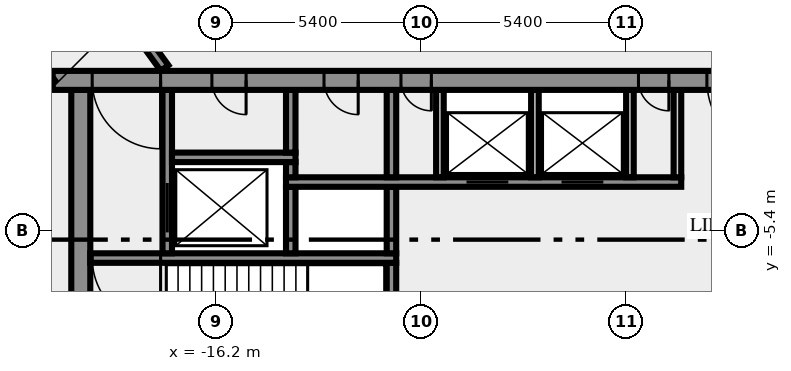
"""IFC4 building model, lengths in metres.
Left out: names, types, materials, properties, quantities, classifications, styles, units other than length and angle.
Written with IfcOpenShell. Run it as: python <this file> out.ifc"""

import sys

from ifc_helpers import new_model, si_unit, direction, frame, frame_2d, origin, place, context, subcontext, project, spatial, rectangle, extrude, element, fill, save


model = new_model("IFC4")
c1 = context("Model", 3, precision=1e-05, world=origin(), true_north=direction((0.0, 1.0)))
c2 = subcontext(c1, "Body", "Model", "MODEL_VIEW")
j1 = project(units=[si_unit("LENGTHUNIT", "METRE"), si_unit("PLANEANGLEUNIT", "RADIAN")], contexts=[c1])
p1 = place(None, origin())
s1 = spatial("IfcSite", under=j1, at=p1, CompositionType="ELEMENT")
p2 = place(p1, origin())
s2 = spatial("IfcBuilding", under=s1, at=p2, CompositionType="ELEMENT")
p3 = place(p2, frame((0.0, 0.0, 319.0)))
s3 = spatial("IfcBuildingStorey", under=s2, at=p3, CompositionType="ELEMENT", Elevation=319.0)
p4 = place(p3, frame((-19.75, -10.5, 0.0), z_axis=(0.0, 0.0, 1.0), x_axis=(0.0, 1.0, 0.0)))
e1 = element("IfcWall", 1, at=p4, inside=s3, PredefinedType="SHEAR", context=c2, shape_type="SweptSolid", body=[
    extrude(rectangle(XDim=8.8, YDim=0.5, at=frame_2d((4.4, 0.0))), origin(), (0.0, 0.0, 1.0), 3.65),
])
p5 = place(p3, frame((-11.575, -7.25, 0.0), z_axis=(0.0, 0.0, 1.0), x_axis=(0.0, 1.0, 0.0)))
e2 = element("IfcWall", 2, at=p5, inside=s3, PredefinedType="SHEAR", context=c2, shape_type="SweptSolid", body=[
    extrude(rectangle(XDim=1.0, YDim=0.25, at=frame_2d((0.5, 0.0))), origin(), (0.0, 0.0, 1.0), 3.65),
])
p6 = place(p3, frame((-11.45, -6.125, 0.0), z_axis=(0.0, 0.0, 1.0), x_axis=(-1.0, 0.0, 0.0)))
e3 = element("IfcWall", 3, at=p6, inside=s3, PredefinedType="SHEAR", context=c2, shape_type="SweptSolid", body=[
    extrude(rectangle(XDim=8.05, YDim=0.25, at=frame_2d((4.025, 0.0))), origin(), (0.0, 0.0, 1.0), 3.65),
])
p7 = place(p6, frame((6.2, 0.0, 0.0)))
e4 = element("IfcOpeningElement", 4, at=p7, cuts=e3, PredefinedType="OPENING", context=c2, shape_type="SweptSolid", body=[
    extrude(rectangle(XDim=1.8, YDim=2.1, at=frame_2d((0.9, 1.05))), frame((0.0, 0.135, 0.0), z_axis=(0.0, -1.0, 0.0), x_axis=(1.0, 0.0, 0.0)), (0.0, 0.0, 1.0), 0.27),
])
p8 = place(p3, frame((-17.475, -6.0, 0.0), z_axis=(0.0, 0.0, 1.0), x_axis=(0.0, 1.0, 0.0)))
e5 = element("IfcWall", 5, at=p8, inside=s3, PredefinedType="SHEAR", context=c2, shape_type="SweptSolid", body=[
    extrude(rectangle(XDim=4.3, YDim=0.25, at=frame_2d((2.15, 0.0))), origin(), (0.0, 0.0, 1.0), 3.65),
])
p9 = place(p8, frame((0.55, 0.0, 0.0)))
e6 = element("IfcOpeningElement", 6, at=p9, cuts=e5, PredefinedType="OPENING", context=c2, shape_type="SweptSolid", body=[
    extrude(rectangle(XDim=1.3, YDim=2.1, at=frame_2d((0.65, 1.05))), frame((0.0, 0.135, 0.0), z_axis=(0.0, -1.0, 0.0), x_axis=(1.0, 0.0, 0.0)), (0.0, 0.0, 1.0), 0.27),
])
for number, where, z_axis, x_axis in (
    (7, (-14.225, -6.0, 0.0), (0.0, 0.0, 1.0), (0.0, 1.0, 0.0)),
    (8, (-11.575, -6.0, 0.0), (0.0, 0.0, 1.0), (0.0, 1.0, 0.0)),
):
    element("IfcWall", number, at=place(p3, frame(where, z_axis=z_axis, x_axis=x_axis)), inside=s3, PredefinedType="SHEAR", context=c2, shape_type="SweptSolid", body=[
        extrude(rectangle(XDim=1.75, YDim=0.25, at=frame_2d((0.875, 0.0))), origin(), (0.0, 0.0, 1.0), 3.65),
    ])
p10 = place(p3, frame((-14.35, -4.125, 0.0), z_axis=(0.0, 0.0, 1.0), x_axis=(1.0, 0.0, 0.0)))
e9 = element("IfcWall", 9, at=p10, inside=s3, PredefinedType="SHEAR", context=c2, shape_type="SweptSolid", body=[
    extrude(rectangle(XDim=10.4, YDim=0.25, at=frame_2d((5.2, 0.0))), origin(), (0.0, 0.0, 1.0), 3.65),
])
p11 = place(p10, frame((4.75, 0.0, 0.0)))
e10 = element("IfcOpeningElement", 10, at=p11, cuts=e9, PredefinedType="OPENING", context=c2, shape_type="SweptSolid", body=[
    extrude(rectangle(XDim=1.1, YDim=2.1, at=frame_2d((0.55, 1.05))), frame((0.0, 0.135, 0.0), z_axis=(0.0, -1.0, 0.0), x_axis=(1.0, 0.0, 0.0)), (0.0, 0.0, 1.0), 0.27),
])
p12 = place(p10, frame((7.25, 0.0, 0.0)))
e11 = element("IfcOpeningElement", 11, at=p12, cuts=e9, PredefinedType="OPENING", context=c2, shape_type="SweptSolid", body=[
    extrude(rectangle(XDim=1.1, YDim=2.1, at=frame_2d((0.55, 1.05))), frame((0.0, 0.135, 0.0), z_axis=(0.0, -1.0, 0.0), x_axis=(1.0, 0.0, 0.0)), (0.0, 0.0, 1.0), 0.27),
])
p13 = place(p3, frame((-14.225, -4.0, 0.0), z_axis=(0.0, 0.0, 1.0), x_axis=(0.0, 1.0, 0.0)))
e12 = element("IfcWall", 12, at=p13, inside=s3, PredefinedType="SHEAR", context=c2, shape_type="SweptSolid", body=[
    extrude(rectangle(XDim=0.4, YDim=0.25, at=frame_2d((0.2, 0.0))), origin(), (0.0, 0.0, 1.0), 3.65),
])
p14 = place(p3, frame((-11.575, -4.0, 0.0), z_axis=(0.0, 0.0, 1.0), x_axis=(0.0, 1.0, 0.0)))
e13 = element("IfcWall", 13, at=p14, inside=s3, PredefinedType="SHEAR", context=c2, shape_type="SweptSolid", body=[
    extrude(rectangle(XDim=2.3, YDim=0.25, at=frame_2d((1.15, 0.0))), origin(), (0.0, 0.0, 1.0), 3.65),
])
for number, where, z_axis, x_axis in (
    (14, (-10.3, -4.0, 0.0), (0.0, 0.0, 1.0), (0.0, 1.0, 0.0)),
    (15, (-7.8, -4.0, 0.0), (0.0, 0.0, 1.0), (0.0, 1.0, 0.0)),
    (16, (-5.3, -4.0, 0.0), (0.0, 0.0, 1.0), (0.0, 1.0, 0.0)),
    (17, (-4.05, -4.0, 0.0), (0.0, 0.0, 1.0), (0.0, 1.0, 0.0)),
):
    element("IfcWall", number, at=place(p3, frame(where, z_axis=z_axis, x_axis=x_axis)), inside=s3, PredefinedType="SOLIDWALL", context=c2, shape_type="SweptSolid", body=[
        extrude(rectangle(XDim=2.3, YDim=0.2, at=frame_2d((1.15, 0.0))), origin(), (0.0, 0.0, 1.0), 3.65),
    ])
p15 = place(p3, frame((-17.35, -3.475, 0.0), z_axis=(0.0, 0.0, 1.0), x_axis=(1.0, 0.0, 0.0)))
e18 = element("IfcWall", 18, at=p15, inside=s3, PredefinedType="SHEAR", context=c2, shape_type="SweptSolid", body=[
    extrude(rectangle(XDim=3.25, YDim=0.25, at=frame_2d((1.625, 0.0))), origin(), (0.0, 0.0, 1.0), 3.65),
])
p16 = place(p3, frame((-14.225, -3.35, 0.0), z_axis=(0.0, 0.0, 1.0), x_axis=(0.0, 1.0, 0.0)))
e19 = element("IfcWall", 19, at=p16, inside=s3, PredefinedType="SHEAR", context=c2, shape_type="SweptSolid", body=[
    extrude(rectangle(XDim=1.65, YDim=0.25, at=frame_2d((0.825, 0.0))), origin(), (0.0, 0.0, 1.0), 3.65),
])
p17 = place(p3, frame((20.49, -1.45, 0.0), z_axis=(0.0, 0.0, 1.0), x_axis=(-1.0, 0.0, 0.0)))
e20 = element("IfcWall", 20, at=p17, inside=s3, PredefinedType="SHEAR", context=c2, shape_type="SweptSolid", body=[
    extrude(rectangle(XDim=40.98, YDim=0.5, at=frame_2d((20.49, 0.0))), origin(), (0.0, 0.0, 1.0), 3.65),
])
p18 = place(p17, frame((38.14, 0.0, 0.0)))
e21 = element("IfcOpeningElement", 21, at=p18, cuts=e20, PredefinedType="OPENING", context=c2, shape_type="SweptSolid", body=[
    extrude(rectangle(XDim=1.8, YDim=2.1, at=frame_2d((0.9, 1.05))), frame((0.0, 0.26, 0.0), z_axis=(0.0, -1.0, 0.0), x_axis=(1.0, 0.0, 0.0)), (0.0, 0.0, 1.0), 0.52),
])
p19 = place(p17, frame((35.89, 0.0, 0.0)))
e22 = element("IfcOpeningElement", 22, at=p19, cuts=e20, PredefinedType="OPENING", context=c2, shape_type="SweptSolid", body=[
    extrude(rectangle(XDim=0.9, YDim=2.1, at=frame_2d((0.45, 1.05))), frame((0.0, 0.26, 0.0), z_axis=(0.0, -1.0, 0.0), x_axis=(1.0, 0.0, 0.0)), (0.0, 0.0, 1.0), 0.52),
])
p20 = place(p17, frame((32.94, 0.0, 0.0)))
e23 = element("IfcOpeningElement", 23, at=p20, cuts=e20, PredefinedType="OPENING", context=c2, shape_type="SweptSolid", body=[
    extrude(rectangle(XDim=0.9, YDim=2.1, at=frame_2d((0.45, 1.05))), frame((0.0, 0.26, 0.0), z_axis=(0.0, -1.0, 0.0), x_axis=(1.0, 0.0, 0.0)), (0.0, 0.0, 1.0), 0.52),
])
p21 = place(p17, frame((31.015, 0.0, 0.0)))
e24 = element("IfcOpeningElement", 24, at=p21, cuts=e20, PredefinedType="OPENING", context=c2, shape_type="SweptSolid", body=[
    extrude(rectangle(XDim=0.8, YDim=2.1, at=frame_2d((0.4, 1.05))), frame((0.0, 0.26, 0.0), z_axis=(0.0, -1.0, 0.0), x_axis=(1.0, 0.0, 0.0)), (0.0, 0.0, 1.0), 0.52),
])
p22 = place(p17, frame((24.765, 0.0, 0.0)))
e25 = element("IfcOpeningElement", 25, at=p22, cuts=e20, PredefinedType="OPENING", context=c2, shape_type="SweptSolid", body=[
    extrude(rectangle(XDim=0.8, YDim=2.1, at=frame_2d((0.4, 1.05))), frame((0.0, 0.26, 0.0), z_axis=(0.0, -1.0, 0.0), x_axis=(1.0, 0.0, 0.0)), (0.0, 0.0, 1.0), 0.52),
])
p23 = place(p17, frame((21.765, 0.0, 0.0)))
e26 = element("IfcOpeningElement", 26, at=p23, cuts=e20, PredefinedType="OPENING", context=c2, shape_type="SweptSolid", body=[
    extrude(rectangle(XDim=2.0, YDim=2.1, at=frame_2d((1.0, 1.05))), frame((0.0, 0.26, 0.0), z_axis=(0.0, -1.0, 0.0), x_axis=(1.0, 0.0, 0.0)), (0.0, 0.0, 1.0), 0.52),
])
p24 = place(p17, frame((15.103, 0.0, 0.0)))
e27 = element("IfcOpeningElement", 27, at=p24, cuts=e20, PredefinedType="OPENING", context=c2, shape_type="SweptSolid", body=[
    extrude(rectangle(XDim=0.9, YDim=2.1, at=frame_2d((0.45, 1.05))), frame((0.0, 0.26, 0.0), z_axis=(0.0, -1.0, 0.0), x_axis=(1.0, 0.0, 0.0)), (0.0, 0.0, 1.0), 0.52),
])
p25 = place(p17, frame((13.04, 0.0, 0.0)))
e28 = element("IfcOpeningElement", 28, at=p25, cuts=e20, PredefinedType="OPENING", context=c2, shape_type="SweptSolid", body=[
    extrude(rectangle(XDim=0.9, YDim=2.1, at=frame_2d((0.45, 1.05))), frame((0.0, 0.26, 0.0), z_axis=(0.0, -1.0, 0.0), x_axis=(1.0, 0.0, 0.0)), (0.0, 0.0, 1.0), 0.52),
])
p26 = place(p17, frame((10.177, 0.0, 0.0)))
e29 = element("IfcOpeningElement", 29, at=p26, cuts=e20, PredefinedType="OPENING", context=c2, shape_type="SweptSolid", body=[
    extrude(rectangle(XDim=0.9, YDim=2.1, at=frame_2d((0.45, 1.05))), frame((0.0, 0.26, 0.0), z_axis=(0.0, -1.0, 0.0), x_axis=(1.0, 0.0, 0.0)), (0.0, 0.0, 1.0), 0.52),
])
p27 = place(p17, frame((7.14, 0.0, 0.0)))
e30 = element("IfcOpeningElement", 30, at=p27, cuts=e20, PredefinedType="OPENING", context=c2, shape_type="SweptSolid", body=[
    extrude(rectangle(XDim=0.9, YDim=2.1, at=frame_2d((0.45, 1.05))), frame((0.0, 0.26, 0.0), z_axis=(0.0, -1.0, 0.0), x_axis=(1.0, 0.0, 0.0)), (0.0, 0.0, 1.0), 0.52),
])
p28 = place(p17, frame((5.028, 0.0, 0.0)))
e31 = element("IfcOpeningElement", 31, at=p28, cuts=e20, PredefinedType="OPENING", context=c2, shape_type="SweptSolid", body=[
    extrude(rectangle(XDim=0.8, YDim=2.1, at=frame_2d((0.4, 1.05))), frame((0.0, 0.26, 0.0), z_axis=(0.0, -1.0, 0.0), x_axis=(1.0, 0.0, 0.0)), (0.0, 0.0, 1.0), 0.52),
])
p29 = place(p17, frame((3.452, 0.0, 0.0)))
e32 = element("IfcOpeningElement", 32, at=p29, cuts=e20, PredefinedType="OPENING", context=c2, shape_type="SweptSolid", body=[
    extrude(rectangle(XDim=0.8, YDim=2.1, at=frame_2d((0.4, 1.05))), frame((0.0, 0.26, 0.0), z_axis=(0.0, -1.0, 0.0), x_axis=(1.0, 0.0, 0.0)), (0.0, 0.0, 1.0), 0.52),
])
p30 = place(p17, frame((1.04, 0.0, 0.0)))
e33 = element("IfcOpeningElement", 33, at=p30, cuts=e20, PredefinedType="OPENING", context=c2, shape_type="SweptSolid", body=[
    extrude(rectangle(XDim=1.8, YDim=2.1, at=frame_2d((0.9, 1.05))), frame((0.0, 0.26, 0.0), z_axis=(0.0, -1.0, 0.0), x_axis=(1.0, 0.0, 0.0)), (0.0, 0.0, 1.0), 0.52),
])
p31 = place(p3, frame((-20.531, -1.523, 0.0), z_axis=(0.0, 0.0, 1.0), x_axis=(-0.587782646447, 0.809018887626, 0.0)))
e34 = element("IfcWall", 34, at=p31, inside=s3, PredefinedType="SOLIDWALL", context=c2, shape_type="SweptSolid", body=[
    extrude(rectangle(XDim=11.27, YDim=0.25, at=frame_2d((5.635, 0.0))), origin(), (0.0, 0.0, 1.0), 3.65),
])
p32 = place(p31, frame((7.566, 0.0, 0.0)))
e35 = element("IfcOpeningElement", 35, at=p32, cuts=e34, PredefinedType="OPENING", context=c2, shape_type="SweptSolid", body=[
    extrude(rectangle(XDim=0.9, YDim=2.1, at=frame_2d((0.45, 1.05))), frame((0.0, 0.135, 0.0), z_axis=(0.0, -1.0, 0.0), x_axis=(1.0, 0.0, 0.0)), (0.0, 0.0, 1.0), 0.27),
])
p33 = place(p31, frame((9.165, 0.0, 0.0)))
e36 = element("IfcOpeningElement", 36, at=p33, cuts=e34, PredefinedType="OPENING", context=c2, shape_type="SweptSolid", body=[
    extrude(rectangle(XDim=0.9, YDim=2.1, at=frame_2d((0.45, 1.05))), frame((0.0, 0.135, 0.0), z_axis=(0.0, -1.0, 0.0), x_axis=(1.0, 0.0, 0.0)), (0.0, 0.0, 1.0), 0.27),
])
p34 = place(p3, frame((-24.865, 8.95, 0.0), z_axis=(0.0, 0.0, 1.0), x_axis=(0.587791617212, -0.809012369952, 0.0)))
e37 = element("IfcWall", 37, at=p34, inside=s3, PredefinedType="SOLIDWALL", context=c2, shape_type="SweptSolid", body=[
    extrude(rectangle(XDim=12.453, YDim=0.25, at=frame_2d((6.227, 0.0))), origin(), (0.0, 0.0, 1.0), 3.65),
])
p35 = place(p34, frame((8.112, 0.0, 0.0)))
e38 = element("IfcOpeningElement", 38, at=p35, cuts=e37, PredefinedType="OPENING", context=c2, shape_type="SweptSolid", body=[
    extrude(rectangle(XDim=0.9, YDim=2.1, at=frame_2d((0.45, 1.05))), frame((0.0, 0.135, 0.0), z_axis=(0.0, -1.0, 0.0), x_axis=(1.0, 0.0, 0.0)), (0.0, 0.0, 1.0), 0.27),
])
p36 = place(p7, origin())
e39 = element("IfcDoor", 39, at=p36, inside=s3, OperationType="DOUBLE_DOOR_SINGLE_SWING", PredefinedType="DOOR", context=c2, shape_type="SweptSolid", body=[
    extrude(rectangle(XDim=1.8, YDim=2.1, at=frame_2d((0.9, 1.05))), frame((0.0, 0.025, 0.0), z_axis=(0.0, -1.0, 0.0), x_axis=(1.0, 0.0, 0.0)), (0.0, 0.0, 1.0), 0.05),
])
fill(e4, e39)
p37 = place(p9, origin())
e40 = element("IfcDoor", 40, at=p37, inside=s3, OperationType="DOUBLE_DOOR_SLIDING", PredefinedType="DOOR", context=c2, shape_type="SweptSolid", body=[
    extrude(rectangle(XDim=1.3, YDim=2.1, at=frame_2d((0.65, 1.05))), frame((0.0, 0.025, 0.0), z_axis=(0.0, -1.0, 0.0), x_axis=(1.0, 0.0, 0.0)), (0.0, 0.0, 1.0), 0.05),
])
fill(e6, e40)
p38 = place(p11, origin())
e41 = element("IfcDoor", 41, at=p38, inside=s3, OperationType="DOUBLE_DOOR_SLIDING", PredefinedType="DOOR", context=c2, shape_type="SweptSolid", body=[
    extrude(rectangle(XDim=1.1, YDim=2.1, at=frame_2d((0.55, 1.05))), frame((0.0, 0.025, 0.0), z_axis=(0.0, -1.0, 0.0), x_axis=(1.0, 0.0, 0.0)), (0.0, 0.0, 1.0), 0.05),
])
fill(e10, e41)
p39 = place(p12, origin())
e42 = element("IfcDoor", 42, at=p39, inside=s3, OperationType="DOUBLE_DOOR_SLIDING", PredefinedType="DOOR", context=c2, shape_type="SweptSolid", body=[
    extrude(rectangle(XDim=1.1, YDim=2.1, at=frame_2d((0.55, 1.05))), frame((0.0, 0.025, 0.0), z_axis=(0.0, -1.0, 0.0), x_axis=(1.0, 0.0, 0.0)), (0.0, 0.0, 1.0), 0.05),
])
fill(e11, e42)
p40 = place(p18, origin())
e43 = element("IfcDoor", 43, at=p40, inside=s3, OperationType="DOUBLE_DOOR_SINGLE_SWING", PredefinedType="DOOR", context=c2, shape_type="SweptSolid", body=[
    extrude(rectangle(XDim=1.8, YDim=2.1, at=frame_2d((0.9, 1.05))), frame((0.0, 0.025, 0.0), z_axis=(0.0, -1.0, 0.0), x_axis=(1.0, 0.0, 0.0)), (0.0, 0.0, 1.0), 0.05),
])
fill(e21, e43)
p41 = place(p19, origin())
e44 = element("IfcDoor", 44, at=p41, inside=s3, OperationType="SINGLE_SWING_RIGHT", PredefinedType="DOOR", context=c2, shape_type="SweptSolid", body=[
    extrude(rectangle(XDim=0.9, YDim=2.1, at=frame_2d((0.45, 1.05))), frame((0.0, 0.025, 0.0), z_axis=(0.0, -1.0, 0.0), x_axis=(1.0, 0.0, 0.0)), (0.0, 0.0, 1.0), 0.05),
])
fill(e22, e44)
p42 = place(p20, origin())
e45 = element("IfcDoor", 45, at=p42, inside=s3, OperationType="SINGLE_SWING_RIGHT", PredefinedType="DOOR", context=c2, shape_type="SweptSolid", body=[
    extrude(rectangle(XDim=0.9, YDim=2.1, at=frame_2d((0.45, 1.05))), frame((0.0, 0.025, 0.0), z_axis=(0.0, -1.0, 0.0), x_axis=(1.0, 0.0, 0.0)), (0.0, 0.0, 1.0), 0.05),
])
fill(e23, e45)
p43 = place(p21, origin())
e46 = element("IfcDoor", 46, at=p43, inside=s3, OperationType="SINGLE_SWING_RIGHT", PredefinedType="DOOR", context=c2, shape_type="SweptSolid", body=[
    extrude(rectangle(XDim=0.8, YDim=2.1, at=frame_2d((0.4, 1.05))), frame((0.0, 0.025, 0.0), z_axis=(0.0, -1.0, 0.0), x_axis=(1.0, 0.0, 0.0)), (0.0, 0.0, 1.0), 0.05),
])
fill(e24, e46)
p44 = place(p22, origin())
e47 = element("IfcDoor", 47, at=p44, inside=s3, OperationType="SINGLE_SWING_RIGHT", PredefinedType="DOOR", context=c2, shape_type="SweptSolid", body=[
    extrude(rectangle(XDim=0.8, YDim=2.1, at=frame_2d((0.4, 1.05))), frame((0.0, 0.025, 0.0), z_axis=(0.0, -1.0, 0.0), x_axis=(1.0, 0.0, 0.0)), (0.0, 0.0, 1.0), 0.05),
])
fill(e25, e47)
p45 = place(p23, origin())
e48 = element("IfcDoor", 48, at=p45, inside=s3, OperationType="DOUBLE_DOOR_SINGLE_SWING", PredefinedType="DOOR", context=c2, shape_type="SweptSolid", body=[
    extrude(rectangle(XDim=2.0, YDim=2.1, at=frame_2d((1.0, 1.05))), frame((0.0, 0.025, 0.0), z_axis=(0.0, -1.0, 0.0), x_axis=(1.0, 0.0, 0.0)), (0.0, 0.0, 1.0), 0.05),
])
fill(e26, e48)
save(model, sys.argv[1])
